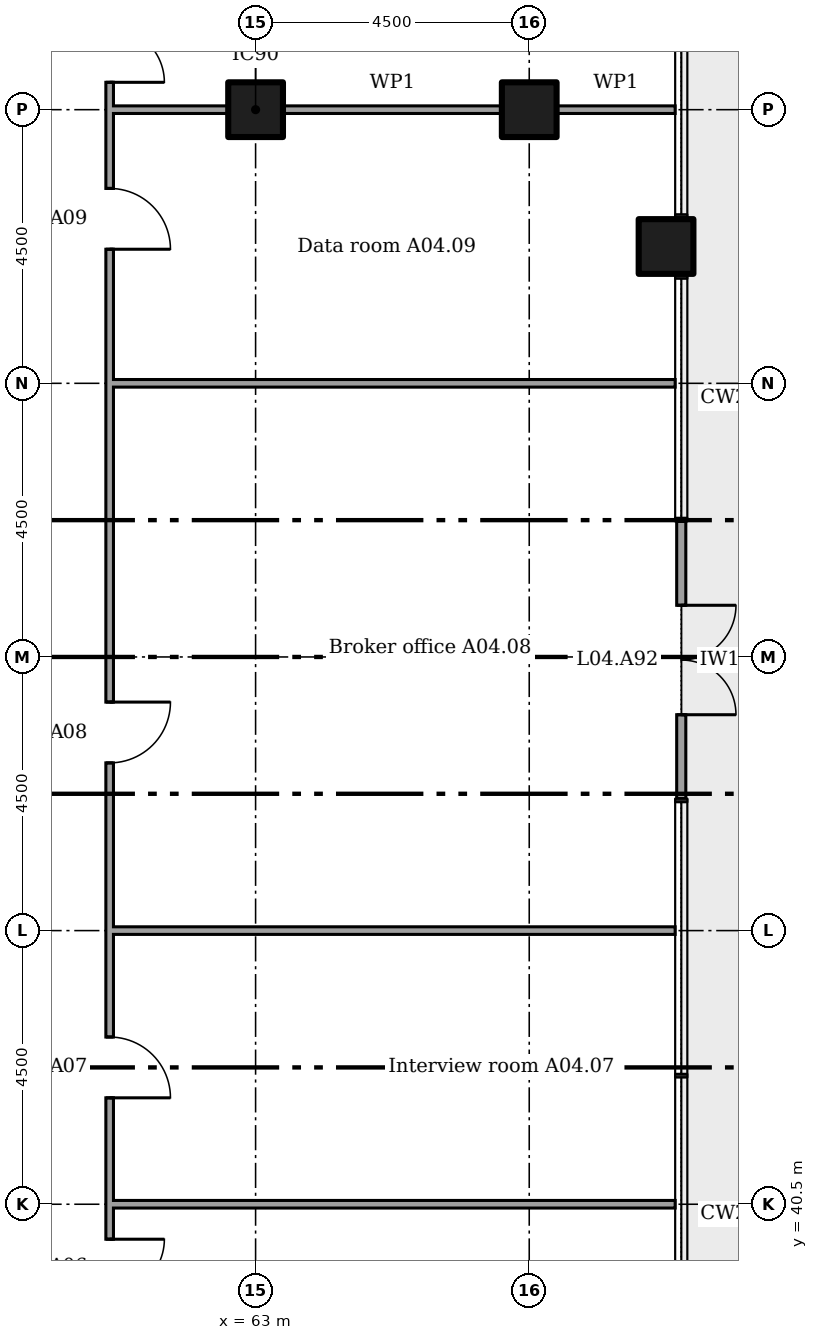
"""IFC4 building model, lengths in metres.
Left out: names, types, materials, properties, quantities, classifications, styles, units other than length and angle.
Written with IfcOpenShell. Run it as: python <this file> out.ifc"""

import sys

from ifc_helpers import new_model, si_unit, direction, frame, frame_2d, origin, origin_2d, place, context, subcontext, project, spatial, rectangle, extrude, element, fill, save


model = new_model("IFC4")
c1 = context("Model", 3, precision=1e-05, world=origin(), true_north=direction((0.0, 1.0)))
c2 = subcontext(c1, "Body", "Model", "MODEL_VIEW")
j1 = project(units=[si_unit("LENGTHUNIT", "METRE"), si_unit("PLANEANGLEUNIT", "RADIAN")], contexts=[c1])
p1 = place(None, origin())
s1 = spatial("IfcSite", under=j1, at=p1, CompositionType="ELEMENT")
p2 = place(p1, origin())
s2 = spatial("IfcBuilding", under=s1, at=p2, CompositionType="ELEMENT")
p3 = place(p2, frame((0.0, 0.0, 21.0)))
s3 = spatial("IfcBuildingStorey", under=s2, at=p3, CompositionType="ELEMENT", Elevation=21.0)
for number, where in (
    (1, (63.0, 58.5, 0.0)),
    (2, (67.5, 58.5, 0.0)),
    (3, (69.75, 56.25, 0.0)),
):
    element("IfcColumn", number, at=place(p3, frame(where)), inside=s3, PredefinedType="COLUMN", context=c2, shape_type="SweptSolid", body=[
        extrude(rectangle(XDim=0.9, YDim=0.9, at=origin_2d()), origin(), (0.0, 0.0, 1.0), 4.4),
    ])
p4 = place(p3, frame((70.0, 47.171, 0.0), z_axis=(0.0, 0.0, 1.0), x_axis=(0.0, 1.0, 0.0)))
e4 = element("IfcWall", 4, at=p4, inside=s3, PredefinedType="SOLIDWALL", context=c2, shape_type="SweptSolid", body=[
    extrude(rectangle(XDim=4.557, YDim=0.15, at=frame_2d((2.279, 0.0))), origin(), (0.0, 0.0, 1.0), 4.225),
])
p5 = place(p4, frame((1.379, 0.0, 0.0)))
e5 = element("IfcOpeningElement", 5, at=p5, cuts=e4, PredefinedType="OPENING", context=c2, shape_type="SweptSolid", body=[
    extrude(rectangle(XDim=1.8, YDim=2.4, at=frame_2d((0.9, 1.2))), frame((0.0, 0.085, 0.0), z_axis=(0.0, -1.0, 0.0), x_axis=(1.0, 0.0, 0.0)), (0.0, 0.0, 1.0), 0.17),
])
for number, where in (
    (6, (60.6, 40.5, 0.0)),
    (7, (60.6, 45.0, 0.0)),
    (8, (60.6, 54.0, 0.0)),
):
    element("IfcWall", number, at=place(p3, frame(where)), inside=s3, PredefinedType="PARTITIONING", context=c2, shape_type="SweptSolid", body=[
        extrude(rectangle(XDim=9.3, YDim=0.125, at=frame_2d((4.65, 0.0))), origin(), (0.0, 0.0, 1.0), 3.467),
    ])
p6 = place(p3, frame((60.6, 58.5, 0.0)))
e9 = element("IfcWall", 9, at=p6, inside=s3, PredefinedType="PARTITIONING", context=c2, shape_type="SweptSolid", body=[
    extrude(rectangle(XDim=1.95, YDim=0.125, at=frame_2d((0.975, 0.0))), origin(), (0.0, 0.0, 1.0), 3.302),
])
p7 = place(p3, frame((63.45, 58.5, 0.0)))
e10 = element("IfcWall", 10, at=p7, inside=s3, PredefinedType="PARTITIONING", context=c2, shape_type="SweptSolid", body=[
    extrude(rectangle(XDim=3.6, YDim=0.125, at=frame_2d((1.8, 0.0))), origin(), (0.0, 0.0, 1.0), 3.302),
])
p8 = place(p3, frame((67.95, 58.5, 0.0)))
e11 = element("IfcWall", 11, at=p8, inside=s3, PredefinedType="PARTITIONING", context=c2, shape_type="SweptSolid", body=[
    extrude(rectangle(XDim=1.95, YDim=0.125, at=frame_2d((0.975, 0.0))), origin(), (0.0, 0.0, 1.0), 3.302),
])
p9 = place(p3, frame((60.6, 38.163, 0.0), z_axis=(0.0, 0.0, 1.0), x_axis=(0.0, 1.0, 0.0)))
e12 = element("IfcWall", 12, at=p9, inside=s3, PredefinedType="PARTITIONING", context=c2, shape_type="SweptSolid", body=[
    extrude(rectangle(XDim=22.975, YDim=0.125, at=frame_2d((11.487, 0.0))), origin(), (0.0, 0.0, 1.0), 4.225),
])
p10 = place(p9, frame((0.863, 0.0, 0.0)))
e13 = element("IfcOpeningElement", 13, at=p10, cuts=e12, PredefinedType="OPENING", context=c2, shape_type="SweptSolid", body=[
    extrude(rectangle(XDim=0.9, YDim=2.1, at=frame_2d((0.45, 1.05))), frame((0.0, 0.073, 0.0), z_axis=(0.0, -1.0, 0.0), x_axis=(1.0, 0.0, 0.0)), (0.0, 0.0, 1.0), 0.145),
])
p11 = place(p9, frame((4.087, 0.0, 0.0)))
e14 = element("IfcOpeningElement", 14, at=p11, cuts=e12, PredefinedType="OPENING", context=c2, shape_type="SweptSolid", body=[
    extrude(rectangle(XDim=1.0, YDim=2.1, at=frame_2d((0.5, 1.05))), frame((0.0, 0.073, 0.0), z_axis=(0.0, -1.0, 0.0), x_axis=(1.0, 0.0, 0.0)), (0.0, 0.0, 1.0), 0.145),
])
p12 = place(p9, frame((9.595, 0.0, 0.0)))
e15 = element("IfcOpeningElement", 15, at=p12, cuts=e12, PredefinedType="OPENING", context=c2, shape_type="SweptSolid", body=[
    extrude(rectangle(XDim=1.0, YDim=2.1, at=frame_2d((0.5, 1.05))), frame((0.0, 0.073, 0.0), z_axis=(0.0, -1.0, 0.0), x_axis=(1.0, 0.0, 0.0)), (0.0, 0.0, 1.0), 0.145),
])
p13 = place(p9, frame((18.042, 0.0, 0.0)))
e16 = element("IfcOpeningElement", 16, at=p13, cuts=e12, PredefinedType="OPENING", context=c2, shape_type="SweptSolid", body=[
    extrude(rectangle(XDim=1.0, YDim=2.1, at=frame_2d((0.5, 1.05))), frame((0.0, 0.073, 0.0), z_axis=(0.0, -1.0, 0.0), x_axis=(1.0, 0.0, 0.0)), (0.0, 0.0, 1.0), 0.145),
])
p14 = place(p9, frame((20.788, 0.0, 0.0)))
e17 = element("IfcOpeningElement", 17, at=p14, cuts=e12, PredefinedType="OPENING", context=c2, shape_type="SweptSolid", body=[
    extrude(rectangle(XDim=1.8, YDim=2.1, at=frame_2d((0.9, 1.05))), frame((0.0, 0.073, 0.0), z_axis=(0.0, -1.0, 0.0), x_axis=(1.0, 0.0, 0.0)), (0.0, 0.0, 1.0), 0.145),
])
p15 = place(p5, frame((1.8, 0.0, 0.0), x_axis=(-1.0, 0.0, 0.0)))
e18 = element("IfcDoor", 18, at=p15, inside=s3, OperationType="DOUBLE_DOOR_DOUBLE_SWING", PredefinedType="NOTDEFINED", context=c2, shape_type="SweptSolid", body=[
    extrude(rectangle(XDim=1.8, YDim=2.4, at=frame_2d((0.9, 1.2))), frame((0.0, 0.025, 0.0), z_axis=(0.0, -1.0, 0.0), x_axis=(1.0, 0.0, 0.0)), (0.0, 0.0, 1.0), 0.05),
])
fill(e5, e18)
p16 = place(p10, frame((0.9, 0.0, 0.0), x_axis=(-1.0, 0.0, 0.0)))
e19 = element("IfcDoor", 19, at=p16, inside=s3, OperationType="SINGLE_SWING_RIGHT", PredefinedType="DOOR", context=c2, shape_type="SweptSolid", body=[
    extrude(rectangle(XDim=0.9, YDim=2.1, at=frame_2d((0.45, 1.05))), frame((0.0, 0.025, 0.0), z_axis=(0.0, -1.0, 0.0), x_axis=(1.0, 0.0, 0.0)), (0.0, 0.0, 1.0), 0.05),
])
fill(e13, e19)
p17 = place(p11, frame((1.0, 0.0, 0.0), x_axis=(-1.0, 0.0, 0.0)))
e20 = element("IfcDoor", 20, at=p17, inside=s3, OperationType="SINGLE_SWING_LEFT", PredefinedType="DOOR", context=c2, shape_type="SweptSolid", body=[
    extrude(rectangle(XDim=1.0, YDim=2.1, at=frame_2d((0.5, 1.05))), frame((0.0, 0.025, 0.0), z_axis=(0.0, -1.0, 0.0), x_axis=(1.0, 0.0, 0.0)), (0.0, 0.0, 1.0), 0.05),
])
fill(e14, e20)
p18 = place(p12, frame((1.0, 0.0, 0.0), x_axis=(-1.0, 0.0, 0.0)))
e21 = element("IfcDoor", 21, at=p18, inside=s3, OperationType="SINGLE_SWING_RIGHT", PredefinedType="DOOR", context=c2, shape_type="SweptSolid", body=[
    extrude(rectangle(XDim=1.0, YDim=2.1, at=frame_2d((0.5, 1.05))), frame((0.0, 0.025, 0.0), z_axis=(0.0, -1.0, 0.0), x_axis=(1.0, 0.0, 0.0)), (0.0, 0.0, 1.0), 0.05),
])
fill(e15, e21)
p19 = place(p13, frame((1.0, 0.0, 0.0), x_axis=(-1.0, 0.0, 0.0)))
e22 = element("IfcDoor", 22, at=p19, inside=s3, OperationType="SINGLE_SWING_LEFT", PredefinedType="DOOR", context=c2, shape_type="SweptSolid", body=[
    extrude(rectangle(XDim=1.0, YDim=2.1, at=frame_2d((0.5, 1.05))), frame((0.0, 0.025, 0.0), z_axis=(0.0, -1.0, 0.0), x_axis=(1.0, 0.0, 0.0)), (0.0, 0.0, 1.0), 0.05),
])
fill(e16, e22)
p20 = place(p14, frame((1.8, 0.0, 0.0), x_axis=(-1.0, 0.0, 0.0)))
e23 = element("IfcDoor", 23, at=p20, inside=s3, OperationType="DOUBLE_DOOR_SINGLE_SWING", PredefinedType="DOOR", context=c2, shape_type="SweptSolid", body=[
    extrude(rectangle(XDim=1.8, YDim=2.1, at=frame_2d((0.9, 1.05))), frame((0.0, 0.025, 0.0), z_axis=(0.0, -1.0, 0.0), x_axis=(1.0, 0.0, 0.0)), (0.0, 0.0, 1.0), 0.05),
])
fill(e17, e23)
save(model, sys.argv[1])
